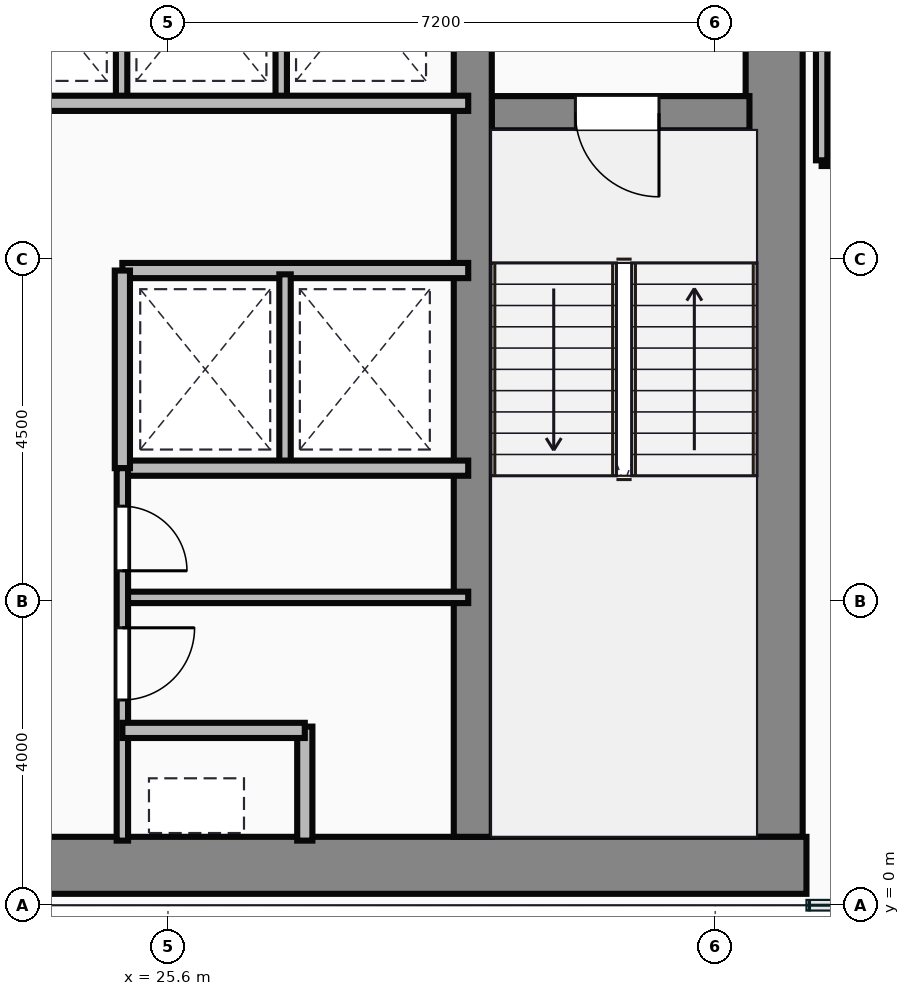
"""IFC4 building model, lengths in metres.
Left out: names, types, materials, properties, quantities, classifications, styles, units other than length and angle.
Written with IfcOpenShell. Run it as: python <this file> out.ifc"""

import sys

from ifc_helpers import new_model, si_unit, direction, frame, frame_2d, origin, place, context, subcontext, project, spatial, rectangle, extrude, source, transform, mapped, element, fill, save


model = new_model("IFC4")
c1 = context("Model", 3, precision=1e-05, world=origin(), true_north=direction((0.0, 1.0)))
c2 = subcontext(c1, "Body", "Model", "MODEL_VIEW")
j1 = project(units=[si_unit("LENGTHUNIT", "METRE"), si_unit("PLANEANGLEUNIT", "RADIAN")], contexts=[c1])
p1 = place(None, origin())
s1 = spatial("IfcSite", under=j1, at=p1, CompositionType="ELEMENT")
p2 = place(p1, origin())
s2 = spatial("IfcBuilding", under=s1, at=p2, CompositionType="ELEMENT")
p3 = place(p2, frame((0.0, 0.0, 166.15)))
s3 = spatial("IfcBuildingStorey", under=s2, at=p3, CompositionType="ELEMENT", Elevation=166.15)
m1 = source(origin(), c2, "Body", "SweptSolid", [
    extrude(rectangle(XDim=29.5, YDim=0.75, at=frame_2d((14.75, 0.0))), origin(), (0.0, 0.0, 1.0), 3.65),
])
p4 = place(p3, frame((4.5, 0.525, 0.0), z_axis=(0.0, 0.0, 1.0), x_axis=(1.0, 0.0, 0.0)))
e1 = element("IfcWall", 1, at=p4, inside=s3, PredefinedType="SHEAR", context=c2, shape_type="MappedRepresentation", body=[
    mapped(m1, transform((0.0, 0.0, 0.0))),
])
m2 = source(origin(), c2, "Body", "SweptSolid", [
    extrude(rectangle(XDim=13.1, YDim=0.75, at=frame_2d((6.55, 0.0))), origin(), (0.0, 0.0, 1.0), 3.65),
])
p5 = place(p3, frame((33.575, 0.9, 0.0), z_axis=(0.0, 0.0, 1.0), x_axis=(0.0, 1.0, 0.0)))
e2 = element("IfcWall", 2, at=p5, inside=s3, PredefinedType="SHEAR", context=c2, shape_type="MappedRepresentation", body=[
    mapped(m2, transform((0.0, 0.0, 0.0))),
])
m3 = source(origin(), c2, "Body", "SweptSolid", [
    extrude(rectangle(XDim=12.35, YDim=0.5, at=frame_2d((6.175, 0.0))), origin(), (0.0, 0.0, 1.0), 3.65),
])
p6 = place(p3, frame((29.61, 0.9, 0.0), z_axis=(0.0, 0.0, 1.0), x_axis=(0.0, 1.0, 0.0)))
e3 = element("IfcWall", 3, at=p6, inside=s3, PredefinedType="SHEAR", context=c2, shape_type="MappedRepresentation", body=[
    mapped(m3, transform((0.0, 0.0, 0.0))),
])
m4 = source(origin(), c2, "Body", "SweptSolid", [
    extrude(rectangle(XDim=3.39, YDim=0.45, at=frame_2d((1.695, 0.0))), origin(), (0.0, 0.0, 1.0), 3.65),
])
p7 = place(p3, frame((29.86, 10.42, 0.0), z_axis=(0.0, 0.0, 1.0), x_axis=(1.0, 0.0, 0.0)))
e4 = element("IfcWall", 4, at=p7, inside=s3, PredefinedType="SHEAR", context=c2, shape_type="MappedRepresentation", body=[
    mapped(m4, transform((0.0, 0.0, 0.0))),
])
p8 = place(p7, frame((1.1, 0.0, 0.0)))
e5 = element("IfcOpeningElement", 5, at=p8, cuts=e4, PredefinedType="OPENING", context=c2, shape_type="SweptSolid", body=[
    extrude(rectangle(XDim=1.1, YDim=2.15, at=frame_2d((0.55, 1.075))), frame((0.0, 0.235, 0.0), z_axis=(0.0, -1.0, 0.0), x_axis=(1.0, 0.0, 0.0)), (0.0, 0.0, 1.0), 0.47),
])
m5 = source(origin(), c2, "Body", "SweptSolid", [
    extrude(rectangle(XDim=8.8, YDim=0.2, at=frame_2d((4.4, 0.0))), origin(), (0.0, 0.0, 1.0), 3.4),
])
p9 = place(p3, frame((20.75, 10.55, 0.0), z_axis=(0.0, 0.0, 1.0), x_axis=(1.0, 0.0, 0.0)))
e6 = element("IfcWall", 6, at=p9, inside=s3, PredefinedType="PARTITIONING", context=c2, shape_type="MappedRepresentation", body=[
    mapped(m5, transform((0.0, 0.0, 0.0))),
])
m6 = source(origin(), c2, "Body", "SweptSolid", [
    extrude(rectangle(XDim=2.85, YDim=0.15, at=frame_2d((1.425, 0.0))), origin(), (0.0, 0.0, 1.0), 3.4),
])
for number, where, z_axis, x_axis in (
    (7, (24.99, 10.6, 0.0), (0.0, 0.0, 1.0), (0.0, 1.0, 0.0)),
    (8, (27.09, 10.6, 0.0), (0.0, 0.0, 1.0), (0.0, 1.0, 0.0)),
):
    element("IfcWall", number, at=place(p3, frame(where, z_axis=z_axis, x_axis=x_axis)), inside=s3, PredefinedType="PARTITIONING", context=c2, shape_type="MappedRepresentation", body=[
        mapped(m6, transform((0.0, 0.0, 0.0))),
    ])
m7 = source(origin(), c2, "Body", "SweptSolid", [
    extrude(rectangle(XDim=4.55, YDim=0.2, at=frame_2d((2.275, 0.0))), origin(), (0.0, 0.0, 1.0), 3.4),
])
for number, where, z_axis, x_axis in (
    (9, (25.0, 8.35, 0.0), (0.0, 0.0, 1.0), (1.0, 0.0, 0.0)),
    (10, (25.0, 5.75, 0.0), (0.0, 0.0, 1.0), (1.0, 0.0, 0.0)),
):
    element("IfcWall", number, at=place(p3, frame(where, z_axis=z_axis, x_axis=x_axis)), inside=s3, PredefinedType="PARTITIONING", context=c2, shape_type="MappedRepresentation", body=[
        mapped(m7, transform((0.0, 0.0, 0.0))),
    ])
m8 = source(origin(), c2, "Body", "SweptSolid", [
    extrude(rectangle(XDim=2.6, YDim=0.2, at=frame_2d((1.3, 0.0))), origin(), (0.0, 0.0, 1.0), 3.4),
])
p10 = place(p3, frame((25.0, 5.75, 0.0), z_axis=(0.0, 0.0, 1.0), x_axis=(0.0, 1.0, 0.0)))
e11 = element("IfcWall", 11, at=p10, inside=s3, PredefinedType="PARTITIONING", context=c2, shape_type="MappedRepresentation", body=[
    mapped(m8, transform((0.0, 0.0, 0.0))),
])
m9 = source(origin(), c2, "Body", "SweptSolid", [
    extrude(rectangle(XDim=2.5, YDim=0.15, at=frame_2d((1.25, 0.0))), origin(), (0.0, 0.0, 1.0), 3.4),
])
p11 = place(p3, frame((27.14, 5.8, 0.0), z_axis=(0.0, 0.0, 1.0), x_axis=(0.0, 1.0, 0.0)))
e12 = element("IfcWall", 12, at=p11, inside=s3, PredefinedType="PARTITIONING", context=c2, shape_type="MappedRepresentation", body=[
    mapped(m9, transform((0.0, 0.0, 0.0))),
])
m10 = source(origin(), c2, "Body", "SweptSolid", [
    extrude(rectangle(XDim=4.9, YDim=0.15, at=frame_2d((2.45, 0.0))), origin(), (0.0, 0.0, 1.0), 3.4),
])
p12 = place(p3, frame((25.0, 0.85, 0.0), z_axis=(0.0, 0.0, 1.0), x_axis=(0.0, 1.0, 0.0)))
e13 = element("IfcWall", 13, at=p12, inside=s3, PredefinedType="PARTITIONING", context=c2, shape_type="MappedRepresentation", body=[
    mapped(m10, transform((0.0, 0.0, 0.0))),
])
p13 = place(p12, frame((1.85, 0.0, 0.0)))
e14 = element("IfcOpeningElement", 14, at=p13, cuts=e13, PredefinedType="OPENING", context=c2, shape_type="SweptSolid", body=[
    extrude(rectangle(XDim=0.95, YDim=2.15, at=frame_2d((0.475, 1.075))), frame((0.0, 0.085, 0.0), z_axis=(0.0, -1.0, 0.0), x_axis=(1.0, 0.0, 0.0)), (0.0, 0.0, 1.0), 0.17),
])
p14 = place(p12, frame((3.55, 0.0, 0.0)))
e15 = element("IfcOpeningElement", 15, at=p14, cuts=e13, PredefinedType="OPENING", context=c2, shape_type="SweptSolid", body=[
    extrude(rectangle(XDim=0.85, YDim=2.15, at=frame_2d((0.425, 1.075))), frame((0.0, 0.085, 0.0), z_axis=(0.0, -1.0, 0.0), x_axis=(1.0, 0.0, 0.0)), (0.0, 0.0, 1.0), 0.17),
])
m11 = source(origin(), c2, "Body", "SweptSolid", [
    extrude(rectangle(XDim=2.4, YDim=0.2, at=frame_2d((1.2, 0.0))), origin(), (0.0, 0.0, 1.0), 3.4),
])
p15 = place(p3, frame((25.0, 2.3, 0.0), z_axis=(0.0, 0.0, 1.0), x_axis=(1.0, 0.0, 0.0)))
e16 = element("IfcWall", 16, at=p15, inside=s3, PredefinedType="PARTITIONING", context=c2, shape_type="MappedRepresentation", body=[
    mapped(m11, transform((0.0, 0.0, 0.0))),
])
m12 = source(origin(), c2, "Body", "SweptSolid", [
    extrude(rectangle(XDim=1.5, YDim=0.2, at=frame_2d((0.75, 0.0))), origin(), (0.0, 0.0, 1.0), 3.4),
])
p16 = place(p3, frame((27.4, 0.85, 0.0), z_axis=(0.0, 0.0, 1.0), x_axis=(0.0, 1.0, 0.0)))
e17 = element("IfcWall", 17, at=p16, inside=s3, PredefinedType="PARTITIONING", context=c2, shape_type="MappedRepresentation", body=[
    mapped(m12, transform((0.0, 0.0, 0.0))),
])
m13 = source(origin(), c2, "Body", "SweptSolid", [
    extrude(rectangle(XDim=4.55, YDim=0.15, at=frame_2d((2.275, 0.0))), origin(), (0.0, 0.0, 1.0), 3.4),
])
p17 = place(p3, frame((25.0, 4.05, 0.0), z_axis=(0.0, 0.0, 1.0), x_axis=(1.0, 0.0, 0.0)))
e18 = element("IfcWall", 18, at=p17, inside=s3, PredefinedType="PARTITIONING", context=c2, shape_type="MappedRepresentation", body=[
    mapped(m13, transform((0.0, 0.0, 0.0))),
])
m14 = source(origin(), c2, "Body", "SweptSolid", [
    extrude(rectangle(XDim=4.8, YDim=0.15, at=frame_2d((2.4, 0.0))), origin(), (0.0, 0.0, 1.0), 3.4),
])
p18 = place(p3, frame((34.2, 9.8, 0.0), z_axis=(0.0, 0.0, 1.0), x_axis=(1.0, 0.0, 0.0)))
e19 = element("IfcWall", 19, at=p18, inside=s3, PredefinedType="PARTITIONING", context=c2, shape_type="MappedRepresentation", body=[
    mapped(m14, transform((0.0, 0.0, 0.0))),
])
m15 = source(origin(), c2, "Body", "SweptSolid", [
    extrude(rectangle(XDim=4.18, YDim=0.15, at=frame_2d((2.09, 0.0))), origin(), (0.0, 0.0, 1.0), 3.4),
])
p19 = place(p3, frame((34.2, 9.8, 0.0), z_axis=(0.0, 0.0, 1.0), x_axis=(0.0, 1.0, 0.0)))
e20 = element("IfcWall", 20, at=p19, inside=s3, PredefinedType="PARTITIONING", context=c2, shape_type="MappedRepresentation", body=[
    mapped(m15, transform((0.0, 0.0, 0.0))),
])
m16 = source(origin(), c2, "Body", "SweptSolid", [
    extrude(rectangle(XDim=1.1, YDim=2.15, at=frame_2d((0.55, 1.075))), frame((0.0, 0.025, 0.0), z_axis=(0.0, -1.0, 0.0), x_axis=(1.0, 0.0, 0.0)), (0.0, 0.0, 1.0), 0.05),
])
p20 = place(p8, frame((1.1, 0.0, 0.0), z_axis=(0.0, 0.0, 1.0), x_axis=(-1.0, 0.0, 0.0)))
e21 = element("IfcDoor", 21, at=p20, inside=s3, OperationType="SINGLE_SWING_RIGHT", PredefinedType="DOOR", context=c2, shape_type="MappedRepresentation", body=[
    mapped(m16, transform((0.0, 0.0, 0.0))),
])
fill(e5, e21)
m17 = source(origin(), c2, "Body", "SweptSolid", [
    extrude(rectangle(XDim=0.95, YDim=2.15, at=frame_2d((0.475, 1.075))), frame((0.0, 0.025, 0.0), z_axis=(0.0, -1.0, 0.0), x_axis=(1.0, 0.0, 0.0)), (0.0, 0.0, 1.0), 0.05),
])
p21 = place(p13, origin())
e22 = element("IfcDoor", 22, at=p21, inside=s3, OperationType="SINGLE_SWING_RIGHT", PredefinedType="DOOR", context=c2, shape_type="MappedRepresentation", body=[
    mapped(m17, transform((0.0, 0.0, 0.0))),
])
fill(e14, e22)
m18 = source(origin(), c2, "Body", "SweptSolid", [
    extrude(rectangle(XDim=0.85, YDim=2.15, at=frame_2d((0.425, 1.075))), frame((0.0, 0.025, 0.0), z_axis=(0.0, -1.0, 0.0), x_axis=(1.0, 0.0, 0.0)), (0.0, 0.0, 1.0), 0.05),
])
p22 = place(p14, origin())
e23 = element("IfcDoor", 23, at=p22, inside=s3, OperationType="SINGLE_SWING_LEFT", PredefinedType="DOOR", context=c2, shape_type="MappedRepresentation", body=[
    mapped(m18, transform((0.0, 0.0, 0.0))),
])
fill(e15, e23)
save(model, sys.argv[1])
